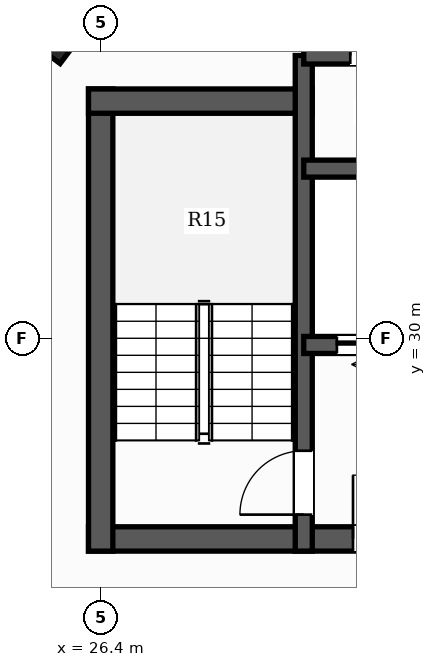
"""IFC4 building model, lengths in metres.
Left out: names, types, materials, properties, quantities, classifications, styles, units other than length and angle.
Written with IfcOpenShell. Run it as: python <this file> out.ifc"""

import sys

from ifc_helpers import new_model, si_unit, direction, frame, frame_2d, origin, origin_2d, place, context, subcontext, project, spatial, rectangle, hollow_rectangle, extrude, element, fill, save


model = new_model("IFC4")
c1 = context("Model", 3, precision=1e-05, world=origin(), true_north=direction((0.0, 1.0)))
c2 = subcontext(c1, "Body", "Model", "MODEL_VIEW")
j1 = project(units=[si_unit("LENGTHUNIT", "METRE"), si_unit("PLANEANGLEUNIT", "RADIAN")], contexts=[c1])
p1 = place(None, origin())
s1 = spatial("IfcSite", under=j1, at=p1, CompositionType="ELEMENT")
p2 = place(p1, origin())
s2 = spatial("IfcBuilding", under=s1, at=p2, CompositionType="ELEMENT")
p3 = place(p2, frame((0.0, 0.0, 123.2)))
s3 = spatial("IfcBuildingStorey", under=s2, at=p3, CompositionType="ELEMENT", Elevation=123.2)
p4 = place(p3, frame((26.2, 26.7, 0.0), z_axis=(0.0, 0.0, 1.0), x_axis=(1.0, 0.0, 0.0)))
e1 = element("IfcWall", 1, at=p4, inside=s3, PredefinedType="SHEAR", context=c2, shape_type="SweptSolid", body=[
    extrude(rectangle(XDim=13.6, YDim=0.4, at=frame_2d((6.8, 0.0))), origin(), (0.0, 0.0, 1.0), 3.3),
])
p5 = place(p4, frame((4.35, 0.0, 0.0)))
e2 = element("IfcOpeningElement", 2, at=p5, cuts=e1, PredefinedType="OPENING", context=c2, shape_type="SweptSolid", body=[
    extrude(rectangle(XDim=1.05, YDim=2.15, at=frame_2d((0.525, 1.075))), frame((0.0, 0.21, 0.0), z_axis=(0.0, -1.0, 0.0), x_axis=(1.0, 0.0, 0.0)), (0.0, 0.0, 1.0), 0.42),
])
p6 = place(p4, frame((8.3, 0.0, 0.0)))
e3 = element("IfcOpeningElement", 3, at=p6, cuts=e1, PredefinedType="OPENING", context=c2, shape_type="SweptSolid", body=[
    extrude(rectangle(XDim=1.05, YDim=2.15, at=frame_2d((0.525, 1.075))), frame((0.0, 0.21, 0.0), z_axis=(0.0, -1.0, 0.0), x_axis=(1.0, 0.0, 0.0)), (0.0, 0.0, 1.0), 0.42),
])
p7 = place(p3, frame((26.4, 26.5, 0.0), z_axis=(0.0, 0.0, 1.0), x_axis=(0.0, 1.0, 0.0)))
e4 = element("IfcWall", 4, at=p7, inside=s3, PredefinedType="SHEAR", context=c2, shape_type="SweptSolid", body=[
    extrude(rectangle(XDim=7.6, YDim=0.4, at=frame_2d((3.8, 0.0))), origin(), (0.0, 0.0, 1.0), 3.3),
])
p8 = place(p3, frame((26.2, 33.9, 0.0), z_axis=(0.0, 0.0, 1.0), x_axis=(1.0, 0.0, 0.0)))
e5 = element("IfcWall", 5, at=p8, inside=s3, PredefinedType="SHEAR", context=c2, shape_type="SweptSolid", body=[
    extrude(rectangle(XDim=3.68, YDim=0.4, at=frame_2d((1.84, 0.0))), origin(), (0.0, 0.0, 1.0), 3.3),
])
p9 = place(p3, frame((29.74, 26.5, 0.0), z_axis=(0.0, 0.0, 1.0), x_axis=(0.0, 1.0, 0.0)))
e6 = element("IfcWall", 6, at=p9, inside=s3, PredefinedType="SHEAR", context=c2, shape_type="SweptSolid", body=[
    extrude(rectangle(XDim=8.15, YDim=0.28, at=frame_2d((4.075, 0.0))), origin(), (0.0, 0.0, 1.0), 3.3),
])
p10 = place(p9, frame((0.6, 0.0, 0.0)))
e7 = element("IfcOpeningElement", 7, at=p10, cuts=e6, PredefinedType="OPENING", context=c2, shape_type="SweptSolid", body=[
    extrude(rectangle(XDim=1.05, YDim=2.15, at=frame_2d((0.525, 1.075))), frame((0.0, 0.15, 0.0), z_axis=(0.0, -1.0, 0.0), x_axis=(1.0, 0.0, 0.0)), (0.0, 0.0, 1.0), 0.3),
])
p11 = place(p3, frame((36.26, 29.89, 0.0), z_axis=(0.0, 0.0, 1.0), x_axis=(-1.0, 0.0, 0.0)))
e8 = element("IfcWall", 8, at=p11, inside=s3, PredefinedType="SHEAR", context=c2, shape_type="SweptSolid", body=[
    extrude(rectangle(XDim=6.52, YDim=0.28, at=frame_2d((3.26, 0.0))), origin(), (0.0, 0.0, 1.0), 3.3),
])
p12 = place(p11, frame((4.875, 0.0, 0.0)))
e9 = element("IfcOpeningElement", 9, at=p12, cuts=e8, PredefinedType="OPENING", context=c2, shape_type="SweptSolid", body=[
    extrude(rectangle(XDim=1.1, YDim=2.2, at=frame_2d((0.55, 1.1))), frame((0.0, 0.15, 0.0), z_axis=(0.0, -1.0, 0.0), x_axis=(1.0, 0.0, 0.0)), (0.0, 0.0, 1.0), 0.3),
])
p13 = place(p11, frame((2.875, 0.0, 0.0)))
e10 = element("IfcOpeningElement", 10, at=p13, cuts=e8, PredefinedType="OPENING", context=c2, shape_type="SweptSolid", body=[
    extrude(rectangle(XDim=1.1, YDim=2.2, at=frame_2d((0.55, 1.1))), frame((0.0, 0.15, 0.0), z_axis=(0.0, -1.0, 0.0), x_axis=(1.0, 0.0, 0.0)), (0.0, 0.0, 1.0), 0.3),
])
p14 = place(p11, frame((0.6, 0.0, 0.0)))
e11 = element("IfcOpeningElement", 11, at=p14, cuts=e8, PredefinedType="OPENING", context=c2, shape_type="SweptSolid", body=[
    extrude(rectangle(XDim=1.3, YDim=2.2, at=frame_2d((0.65, 1.1))), frame((0.0, 0.15, 0.0), z_axis=(0.0, -1.0, 0.0), x_axis=(1.0, 0.0, 0.0)), (0.0, 0.0, 1.0), 0.3),
])
p15 = place(p3, frame((29.74, 32.79, 0.0), z_axis=(0.0, 0.0, 1.0), x_axis=(1.0, 0.0, 0.0)))
e12 = element("IfcWall", 12, at=p15, inside=s3, PredefinedType="SHEAR", context=c2, shape_type="SweptSolid", body=[
    extrude(rectangle(XDim=6.52, YDim=0.28, at=frame_2d((3.26, 0.0))), origin(), (0.0, 0.0, 1.0), 3.3),
])
p16 = place(p3, frame((29.74, 34.65, 0.0), z_axis=(0.0, 0.0, 1.0), x_axis=(1.0, 0.0, 0.0)))
e13 = element("IfcWall", 13, at=p16, inside=s3, PredefinedType="SHEAR", context=c2, shape_type="SweptSolid", body=[
    extrude(rectangle(XDim=6.52, YDim=0.28, at=frame_2d((3.26, 0.0))), origin(), (0.0, 0.0, 1.0), 3.3),
])
p17 = place(p16, frame((0.765, 0.0, 0.0)))
e14 = element("IfcOpeningElement", 14, at=p17, cuts=e13, PredefinedType="OPENING", context=c2, shape_type="SweptSolid", body=[
    extrude(rectangle(XDim=0.82, YDim=2.1, at=frame_2d((0.41, 1.05))), frame((0.0, 0.15, 0.0), z_axis=(0.0, -1.0, 0.0), x_axis=(1.0, 0.0, 0.0)), (0.0, 0.0, 1.0), 0.3),
])
p18 = place(p16, frame((2.84, 0.0, 0.0)))
e15 = element("IfcOpeningElement", 15, at=p18, cuts=e13, PredefinedType="OPENING", context=c2, shape_type="SweptSolid", body=[
    extrude(rectangle(XDim=0.82, YDim=2.1, at=frame_2d((0.41, 1.05))), frame((0.0, 0.15, 0.0), z_axis=(0.0, -1.0, 0.0), x_axis=(1.0, 0.0, 0.0)), (0.0, 0.0, 1.0), 0.3),
])
p19 = place(p16, frame((4.915, 0.0, 0.0)))
e16 = element("IfcOpeningElement", 16, at=p19, cuts=e13, PredefinedType="OPENING", context=c2, shape_type="SweptSolid", body=[
    extrude(rectangle(XDim=0.82, YDim=2.1, at=frame_2d((0.41, 1.05))), frame((0.0, 0.15, 0.0), z_axis=(0.0, -1.0, 0.0), x_axis=(1.0, 0.0, 0.0)), (0.0, 0.0, 1.0), 0.3),
])
p20 = place(p3, frame((25.648, 35.113, 0.0), z_axis=(0.0, 0.0, 1.0), x_axis=(0.600420225326, 0.799684658487, 0.0)))
e17 = element("IfcColumn", 17, at=p20, inside=s3, PredefinedType="COLUMN", context=c2, shape_type="SweptSolid", body=[
    extrude(hollow_rectangle(XDim=0.85, YDim=0.85, WallThickness=0.028, at=origin_2d()), origin(), (0.0, 0.0, 1.0), 3.3),
])
p21 = place(p10, origin())
e18 = element("IfcDoor", 18, at=p21, inside=s3, OperationType="SINGLE_SWING_LEFT", PredefinedType="DOOR", context=c2, shape_type="SweptSolid", body=[
    extrude(rectangle(XDim=1.05, YDim=2.15, at=frame_2d((0.525, 1.075))), frame((0.0, 0.025, 0.0), z_axis=(0.0, -1.0, 0.0), x_axis=(1.0, 0.0, 0.0)), (0.0, 0.0, 1.0), 0.05),
])
fill(e7, e18)
p22 = place(p5, origin())
e19 = element("IfcDoor", 19, at=p22, inside=s3, OperationType="SINGLE_SWING_LEFT", PredefinedType="DOOR", context=c2, shape_type="SweptSolid", body=[
    extrude(rectangle(XDim=1.05, YDim=2.15, at=frame_2d((0.525, 1.075))), frame((0.0, 0.025, 0.0), z_axis=(0.0, -1.0, 0.0), x_axis=(1.0, 0.0, 0.0)), (0.0, 0.0, 1.0), 0.05),
])
fill(e2, e19)
p23 = place(p12, origin())
e20 = element("IfcDoor", 20, at=p23, inside=s3, OperationType="DOUBLE_DOOR_SLIDING", PredefinedType="DOOR", context=c2, shape_type="SweptSolid", body=[
    extrude(rectangle(XDim=1.1, YDim=2.2, at=frame_2d((0.55, 1.1))), frame((0.0, 0.025, 0.0), z_axis=(0.0, -1.0, 0.0), x_axis=(1.0, 0.0, 0.0)), (0.0, 0.0, 1.0), 0.05),
])
fill(e9, e20)
p24 = place(p17, origin())
e21 = element("IfcDoor", 21, at=p24, inside=s3, OperationType="SINGLE_SWING_LEFT", PredefinedType="DOOR", context=c2, shape_type="SweptSolid", body=[
    extrude(rectangle(XDim=0.82, YDim=2.1, at=frame_2d((0.41, 1.05))), frame((0.0, 0.025, 0.0), z_axis=(0.0, -1.0, 0.0), x_axis=(1.0, 0.0, 0.0)), (0.0, 0.0, 1.0), 0.05),
])
fill(e14, e21)
save(model, sys.argv[1])
